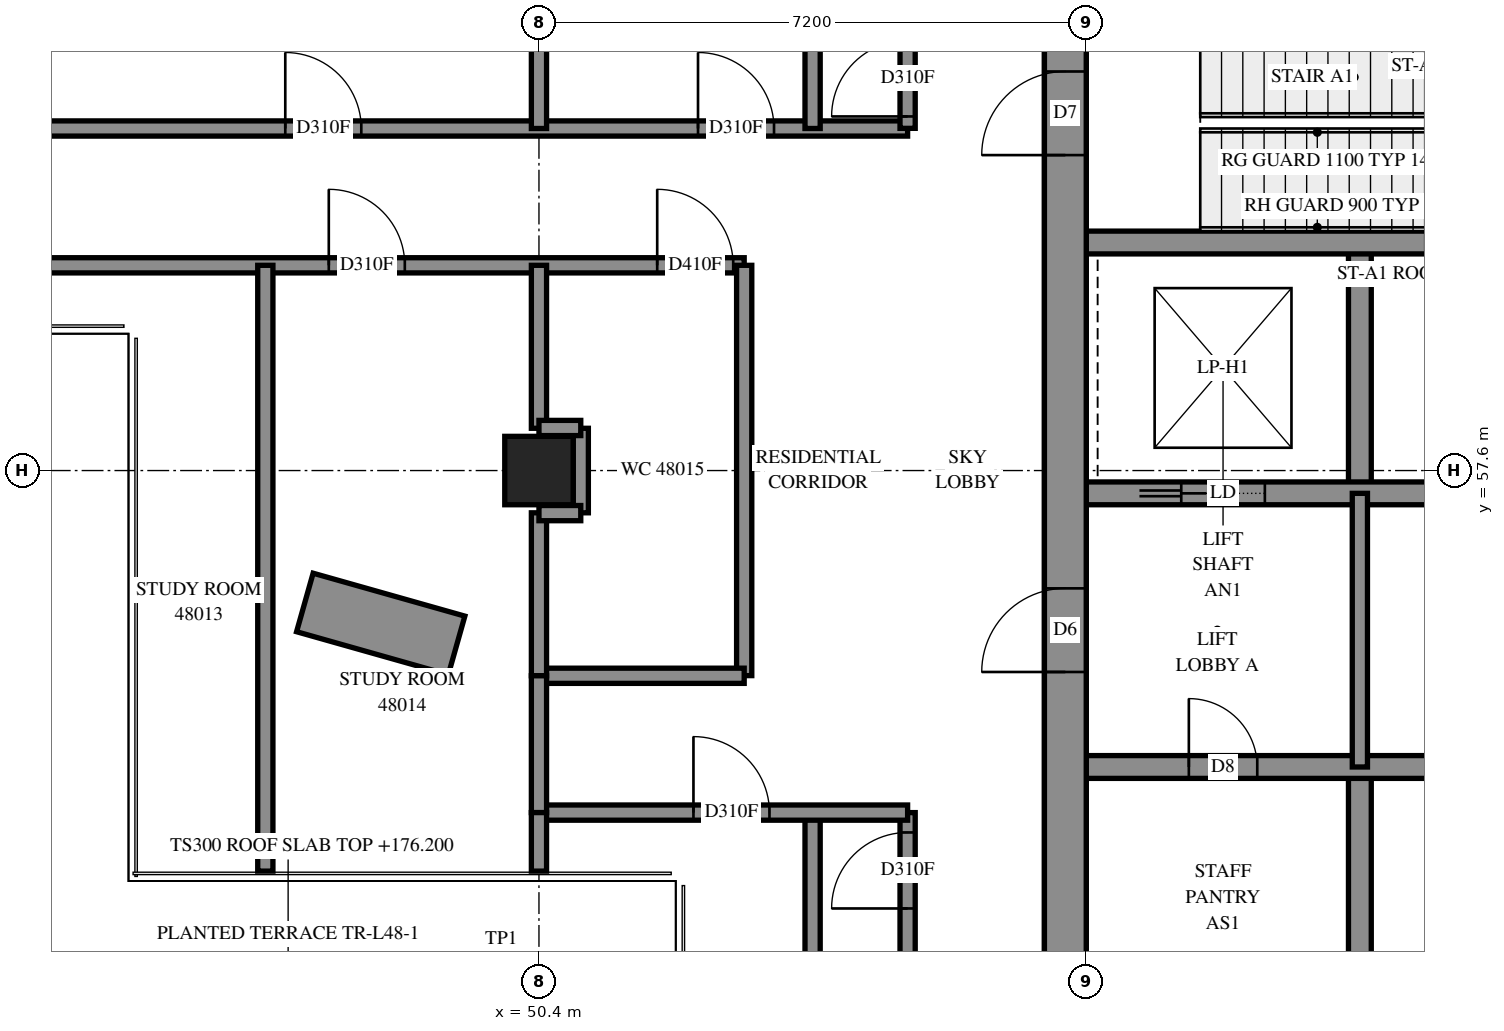
"""IFC4 building model, lengths in metres.
Left out: names, types, materials, properties, quantities, classifications, styles, units other than length and angle.
Written with IfcOpenShell. Run it as: python <this file> out.ifc"""

import sys

from ifc_helpers import new_model, si_unit, direction, frame, frame_2d, origin, origin_2d, place, context, subcontext, project, spatial, polyline, rectangle, outline, extrude, element, fill, save


model = new_model("IFC4")
c1 = context("Model", 3, precision=1e-05, world=origin(), true_north=direction((0.0, 1.0)))
c2 = subcontext(c1, "Body", "Model", "MODEL_VIEW")
j1 = project(units=[si_unit("LENGTHUNIT", "METRE"), si_unit("PLANEANGLEUNIT", "RADIAN")], contexts=[c1])
p1 = place(None, origin())
s1 = spatial("IfcSite", under=j1, at=p1, CompositionType="ELEMENT")
p2 = place(p1, origin())
s2 = spatial("IfcBuilding", under=s1, at=p2, CompositionType="ELEMENT")
p3 = place(p2, frame((0.0, 0.0, 176.2)))
s3 = spatial("IfcBuildingStorey", under=s2, at=p3, CompositionType="ELEMENT", Elevation=176.2)
p4 = place(p3, frame((50.4, 57.6, 0.0), z_axis=(0.0, 0.0, 1.0), x_axis=(1.0, 0.0, 0.0)))
e1 = element("IfcColumn", 1, at=p4, inside=s3, PredefinedType="COLUMN", context=c2, shape_type="SweptSolid", body=[
    extrude(rectangle(XDim=0.9, YDim=0.9, at=origin_2d()), origin(), (0.0, 0.0, 1.0), 3.9),
])
p5 = place(p3, frame((57.325, 50.4, -0.3), z_axis=(0.0, 0.0, 1.0), x_axis=(0.0, 1.0, 0.0)))
e2 = element("IfcWall", 2, at=p5, inside=s3, PredefinedType="SHEAR", context=c2, shape_type="SweptSolid", body=[
    extrude(rectangle(XDim=14.4, YDim=0.55, at=frame_2d((7.2, 0.0))), origin(), (0.0, 0.0, 1.0), 3.5),
])
p6 = place(p5, frame((4.55, 0.0, 0.3)))
e3 = element("IfcOpeningElement", 3, at=p6, cuts=e2, PredefinedType="OPENING", context=c2, shape_type="SweptSolid", body=[
    extrude(rectangle(XDim=1.1, YDim=2.1, at=frame_2d((0.55, 1.05))), frame((0.0, 0.285, 0.0), z_axis=(0.0, -1.0, 0.0), x_axis=(1.0, 0.0, 0.0)), (0.0, 0.0, 1.0), 0.57),
])
p7 = place(p5, frame((11.35, 0.0, 0.3)))
e4 = element("IfcOpeningElement", 4, at=p7, cuts=e2, PredefinedType="OPENING", context=c2, shape_type="SweptSolid", body=[
    extrude(rectangle(XDim=1.1, YDim=2.1, at=frame_2d((0.55, 1.05))), frame((0.0, 0.285, 0.0), z_axis=(0.0, -1.0, 0.0), x_axis=(1.0, 0.0, 0.0)), (0.0, 0.0, 1.0), 0.57),
])
for number, where, z_axis, x_axis in (
    (5, (61.2, 50.4, 0.0), (0.0, 0.0, 1.0), (0.0, 1.0, 0.0)),
    (6, (61.2, 57.3, 0.0), (0.0, 0.0, 1.0), (0.0, 1.0, 0.0)),
):
    element("IfcWall", number, at=place(p3, frame(where, z_axis=z_axis, x_axis=x_axis)), inside=s3, PredefinedType="SOLIDWALL", context=c2, shape_type="SweptSolid", body=[
        extrude(rectangle(XDim=3.3, YDim=0.3, at=frame_2d((1.65, 0.0))), origin(), (0.0, 0.0, 1.0), 3.9),
    ])
p8 = place(p3, frame((57.6, 53.7, 0.0), z_axis=(0.0, 0.0, 1.0), x_axis=(1.0, 0.0, 0.0)))
e7 = element("IfcWall", 7, at=p8, inside=s3, PredefinedType="SOLIDWALL", context=c2, shape_type="SweptSolid", body=[
    extrude(rectangle(XDim=14.4, YDim=0.3, at=frame_2d((7.2, 0.0))), origin(), (0.0, 0.0, 1.0), 3.9),
])
p9 = place(p8, frame((1.35, 0.0, 0.0)))
e8 = element("IfcOpeningElement", 8, at=p9, cuts=e7, PredefinedType="OPENING", context=c2, shape_type="SweptSolid", body=[
    extrude(rectangle(XDim=0.9, YDim=2.1, at=frame_2d((0.45, 1.05))), frame((0.0, 0.16, 0.0), z_axis=(0.0, -1.0, 0.0), x_axis=(1.0, 0.0, 0.0)), (0.0, 0.0, 1.0), 0.32),
])
p10 = place(p8, frame((4.95, 0.0, 0.0)))
e9 = element("IfcOpeningElement", 9, at=p10, cuts=e7, PredefinedType="OPENING", context=c2, shape_type="SweptSolid", body=[
    extrude(rectangle(XDim=0.9, YDim=2.1, at=frame_2d((0.45, 1.05))), frame((0.0, 0.16, 0.0), z_axis=(0.0, -1.0, 0.0), x_axis=(1.0, 0.0, 0.0)), (0.0, 0.0, 1.0), 0.32),
])
p11 = place(p8, frame((8.55, 0.0, 0.0)))
e10 = element("IfcOpeningElement", 10, at=p11, cuts=e7, PredefinedType="OPENING", context=c2, shape_type="SweptSolid", body=[
    extrude(rectangle(XDim=0.9, YDim=2.1, at=frame_2d((0.45, 1.05))), frame((0.0, 0.16, 0.0), z_axis=(0.0, -1.0, 0.0), x_axis=(1.0, 0.0, 0.0)), (0.0, 0.0, 1.0), 0.32),
])
p12 = place(p8, frame((12.05, 0.0, 0.0)))
e11 = element("IfcOpeningElement", 11, at=p12, cuts=e7, PredefinedType="OPENING", context=c2, shape_type="SweptSolid", body=[
    extrude(rectangle(XDim=1.1, YDim=2.1, at=frame_2d((0.55, 1.05))), frame((0.0, 0.16, 0.0), z_axis=(0.0, -1.0, 0.0), x_axis=(1.0, 0.0, 0.0)), (0.0, 0.0, 1.0), 0.32),
])
p13 = place(p3, frame((57.6, 57.3, 0.0), z_axis=(0.0, 0.0, 1.0), x_axis=(1.0, 0.0, 0.0)))
e12 = element("IfcWall", 12, at=p13, inside=s3, PredefinedType="SOLIDWALL", context=c2, shape_type="SweptSolid", body=[
    extrude(rectangle(XDim=14.4, YDim=0.3, at=frame_2d((7.2, 0.0))), origin(), (0.0, 0.0, 1.0), 3.9),
])
p14 = place(p13, frame((1.25, 0.0, 0.0)))
e13 = element("IfcOpeningElement", 13, at=p14, cuts=e12, PredefinedType="OPENING", context=c2, shape_type="SweptSolid", body=[
    extrude(rectangle(XDim=1.1, YDim=2.1, at=frame_2d((0.55, 1.05))), frame((0.0, 0.16, 0.0), z_axis=(0.0, -1.0, 0.0), x_axis=(1.0, 0.0, 0.0)), (0.0, 0.0, 1.0), 0.32),
])
p15 = place(p13, frame((4.85, 0.0, 0.0)))
e14 = element("IfcOpeningElement", 14, at=p15, cuts=e12, PredefinedType="OPENING", context=c2, shape_type="SweptSolid", body=[
    extrude(rectangle(XDim=1.1, YDim=2.1, at=frame_2d((0.55, 1.05))), frame((0.0, 0.16, 0.0), z_axis=(0.0, -1.0, 0.0), x_axis=(1.0, 0.0, 0.0)), (0.0, 0.0, 1.0), 0.32),
])
p16 = place(p13, frame((8.45, 0.0, 0.0)))
e15 = element("IfcOpeningElement", 15, at=p16, cuts=e12, PredefinedType="OPENING", context=c2, shape_type="SweptSolid", body=[
    extrude(rectangle(XDim=1.1, YDim=2.1, at=frame_2d((0.55, 1.05))), frame((0.0, 0.16, 0.0), z_axis=(0.0, -1.0, 0.0), x_axis=(1.0, 0.0, 0.0)), (0.0, 0.0, 1.0), 0.32),
])
p17 = place(p13, frame((12.05, 0.0, 0.0)))
e16 = element("IfcOpeningElement", 16, at=p17, cuts=e12, PredefinedType="OPENING", context=c2, shape_type="SweptSolid", body=[
    extrude(rectangle(XDim=1.1, YDim=2.1, at=frame_2d((0.55, 1.05))), frame((0.0, 0.16, 0.0), z_axis=(0.0, -1.0, 0.0), x_axis=(1.0, 0.0, 0.0)), (0.0, 0.0, 1.0), 0.32),
])
p18 = place(p3, frame((57.6, 60.6, 0.0), z_axis=(0.0, 0.0, 1.0), x_axis=(1.0, 0.0, 0.0)))
e17 = element("IfcWall", 17, at=p18, inside=s3, PredefinedType="SOLIDWALL", context=c2, shape_type="SweptSolid", body=[
    extrude(rectangle(XDim=7.2, YDim=0.3, at=frame_2d((3.6, 0.0))), origin(), (0.0, 0.0, 1.0), 3.9),
])
p19 = place(p3, frame((61.2, 53.7, 0.0), z_axis=(0.0, 0.0, 1.0), x_axis=(0.0, 1.0, 0.0)))
e18 = element("IfcWall", 18, at=p19, inside=s3, PredefinedType="PARTITIONING", context=c2, shape_type="SweptSolid", body=[
    extrude(rectangle(XDim=3.6, YDim=0.2, at=frame_2d((1.8, 0.0))), origin(), (0.0, 0.0, 1.0), 3.9),
])
p20 = place(p3, frame((37.93, 60.3, 0.0), z_axis=(0.0, 0.0, 1.0), x_axis=(1.0, 0.0, 0.0)))
e19 = element("IfcWall", 19, at=p20, inside=s3, PredefinedType="PARTITIONING", context=c2, shape_type="SweptSolid", body=[
    extrude(rectangle(XDim=15.17, YDim=0.2, at=frame_2d((7.585, 0.0))), origin(), (0.0, 0.0, 1.0), 3.9),
])
p21 = place(p20, frame((3.139, 0.0, 0.0)))
e20 = element("IfcOpeningElement", 20, at=p21, cuts=e19, PredefinedType="OPENING", context=c2, shape_type="SweptSolid", body=[
    extrude(rectangle(XDim=1.0, YDim=2.1, at=frame_2d((0.5, 1.05))), frame((0.0, 0.11, 0.0), z_axis=(0.0, -1.0, 0.0), x_axis=(1.0, 0.0, 0.0)), (0.0, 0.0, 1.0), 0.22),
])
p22 = place(p20, frame((9.705, 0.0, 0.0)))
e21 = element("IfcOpeningElement", 21, at=p22, cuts=e19, PredefinedType="OPENING", context=c2, shape_type="SweptSolid", body=[
    extrude(rectangle(XDim=1.0, YDim=2.1, at=frame_2d((0.5, 1.05))), frame((0.0, 0.11, 0.0), z_axis=(0.0, -1.0, 0.0), x_axis=(1.0, 0.0, 0.0)), (0.0, 0.0, 1.0), 0.22),
])
p23 = place(p20, frame((14.026, 0.0, 0.0)))
e22 = element("IfcOpeningElement", 22, at=p23, cuts=e19, PredefinedType="OPENING", context=c2, shape_type="SweptSolid", body=[
    extrude(rectangle(XDim=1.0, YDim=2.1, at=frame_2d((0.5, 1.05))), frame((0.0, 0.11, 0.0), z_axis=(0.0, -1.0, 0.0), x_axis=(1.0, 0.0, 0.0)), (0.0, 0.0, 1.0), 0.22),
])
p24 = place(p3, frame((40.502, 62.1, 0.0), z_axis=(0.0, 0.0, 1.0), x_axis=(1.0, 0.0, 0.0)))
e23 = element("IfcWall", 23, at=p24, inside=s3, PredefinedType="PARTITIONING", context=c2, shape_type="SweptSolid", body=[
    extrude(rectangle(XDim=14.748, YDim=0.2, at=frame_2d((7.374, 0.0))), origin(), (0.0, 0.0, 1.0), 3.9),
])
p25 = place(p24, frame((0.265, 0.0, 0.0)))
e24 = element("IfcOpeningElement", 24, at=p25, cuts=e23, PredefinedType="OPENING", context=c2, shape_type="SweptSolid", body=[
    extrude(rectangle(XDim=1.0, YDim=2.1, at=frame_2d((0.5, 1.05))), frame((0.0, 0.11, 0.0), z_axis=(0.0, -1.0, 0.0), x_axis=(1.0, 0.0, 0.0)), (0.0, 0.0, 1.0), 0.22),
])
p26 = place(p24, frame((6.561, 0.0, 0.0)))
e25 = element("IfcOpeningElement", 25, at=p26, cuts=e23, PredefinedType="OPENING", context=c2, shape_type="SweptSolid", body=[
    extrude(rectangle(XDim=1.0, YDim=2.1, at=frame_2d((0.5, 1.05))), frame((0.0, 0.11, 0.0), z_axis=(0.0, -1.0, 0.0), x_axis=(1.0, 0.0, 0.0)), (0.0, 0.0, 1.0), 0.22),
])
p27 = place(p24, frame((11.991, 0.0, 0.0)))
e26 = element("IfcOpeningElement", 26, at=p27, cuts=e23, PredefinedType="OPENING", context=c2, shape_type="SweptSolid", body=[
    extrude(rectangle(XDim=1.0, YDim=2.1, at=frame_2d((0.5, 1.05))), frame((0.0, 0.11, 0.0), z_axis=(0.0, -1.0, 0.0), x_axis=(1.0, 0.0, 0.0)), (0.0, 0.0, 1.0), 0.22),
])
for number, where, z_axis, x_axis in (
    (27, (46.8, 52.33, 0.0), (0.0, 0.0, 1.0), (0.0, 1.0, 0.0)),
    (28, (54.0, 45.13, 0.0), (0.0, 0.0, 1.0), (0.0, 1.0, 0.0)),
    (29, (54.0, 62.1, 0.0), (0.0, 0.0, 1.0), (0.0, 1.0, 0.0)),
):
    element("IfcWall", number, at=place(p3, frame(where, z_axis=z_axis, x_axis=x_axis)), inside=s3, PredefinedType="PARTITIONING", context=c2, shape_type="SweptSolid", body=[
        extrude(rectangle(XDim=7.97, YDim=0.2, at=frame_2d((3.985, 0.0))), origin(), (0.0, 0.0, 1.0), 3.9),
    ])
p28 = place(p3, frame((53.1, 54.902, 0.0), z_axis=(0.0, 0.0, 1.0), x_axis=(0.0, 1.0, 0.0)))
e30 = element("IfcWall", 30, at=p28, inside=s3, PredefinedType="PARTITIONING", context=c2, shape_type="SweptSolid", body=[
    extrude(rectangle(XDim=5.398, YDim=0.2, at=frame_2d((2.699, 0.0))), origin(), (0.0, 0.0, 1.0), 3.9),
])
p29 = place(p3, frame((55.25, 48.05, 0.0), z_axis=(0.0, 0.0, 1.0), x_axis=(0.0, 1.0, 0.0)))
e31 = element("IfcWall", 31, at=p29, inside=s3, PredefinedType="PARTITIONING", context=c2, shape_type="SweptSolid", body=[
    extrude(rectangle(XDim=5.05, YDim=0.2, at=frame_2d((2.525, 0.0))), origin(), (0.0, 0.0, 1.0), 3.9),
])
p30 = place(p29, frame((3.789, 0.0, 0.0)))
e32 = element("IfcOpeningElement", 32, at=p30, cuts=e31, PredefinedType="OPENING", context=c2, shape_type="SweptSolid", body=[
    extrude(rectangle(XDim=1.0, YDim=2.1, at=frame_2d((0.5, 1.05))), frame((0.0, 0.11, 0.0), z_axis=(0.0, -1.0, 0.0), x_axis=(1.0, 0.0, 0.0)), (0.0, 0.0, 1.0), 0.22),
])
p31 = place(p3, frame((55.25, 62.102, 0.0), z_axis=(0.0, 0.0, 1.0), x_axis=(0.0, 1.0, 0.0)))
e33 = element("IfcWall", 33, at=p31, inside=s3, PredefinedType="PARTITIONING", context=c2, shape_type="SweptSolid", body=[
    extrude(rectangle(XDim=5.048, YDim=0.2, at=frame_2d((2.524, 0.0))), origin(), (0.0, 0.0, 1.0), 3.9),
])
p32 = place(p31, frame((0.157, 0.0, 0.0)))
e34 = element("IfcOpeningElement", 34, at=p32, cuts=e33, PredefinedType="OPENING", context=c2, shape_type="SweptSolid", body=[
    extrude(rectangle(XDim=1.0, YDim=2.1, at=frame_2d((0.5, 1.05))), frame((0.0, 0.11, 0.0), z_axis=(0.0, -1.0, 0.0), x_axis=(1.0, 0.0, 0.0)), (0.0, 0.0, 1.0), 0.22),
])
p33 = place(p3, frame((50.4, 53.1, 0.0), z_axis=(0.0, 0.0, 1.0), x_axis=(1.0, 0.0, 0.0)))
e35 = element("IfcWall", 35, at=p33, inside=s3, PredefinedType="PARTITIONING", context=c2, shape_type="SweptSolid", body=[
    extrude(rectangle(XDim=4.85, YDim=0.2, at=frame_2d((2.425, 0.0))), origin(), (0.0, 0.0, 1.0), 3.9),
])
p34 = place(p33, frame((2.033, 0.0, 0.0)))
e36 = element("IfcOpeningElement", 36, at=p34, cuts=e35, PredefinedType="OPENING", context=c2, shape_type="SweptSolid", body=[
    extrude(rectangle(XDim=1.0, YDim=2.1, at=frame_2d((0.5, 1.05))), frame((0.0, 0.11, 0.0), z_axis=(0.0, -1.0, 0.0), x_axis=(1.0, 0.0, 0.0)), (0.0, 0.0, 1.0), 0.22),
])
p35 = place(p3, frame((50.4, 54.9, 0.0), z_axis=(0.0, 0.0, 1.0), x_axis=(1.0, 0.0, 0.0)))
e37 = element("IfcWall", 37, at=p35, inside=s3, PredefinedType="PARTITIONING", context=c2, shape_type="SweptSolid", body=[
    extrude(rectangle(XDim=2.7, YDim=0.2, at=frame_2d((1.35, 0.0))), origin(), (0.0, 0.0, 1.0), 3.9),
])
p36 = place(p3, frame((50.4, 62.1, 0.0), z_axis=(0.0, 0.0, 1.0), x_axis=(0.0, 1.0, 0.0)))
e38 = element("IfcWall", 38, at=p36, inside=s3, PredefinedType="PARTITIONING", context=c2, shape_type="SweptSolid", body=[
    extrude(rectangle(XDim=2.25, YDim=0.2, at=frame_2d((1.125, 0.0))), origin(), (0.0, 0.0, 1.0), 3.9),
])
for number, where, z_axis, x_axis in (
    (39, (50.4, 54.9, 0.0), (0.0, 0.0, 1.0), (0.0, 1.0, 0.0)),
    (40, (50.4, 58.156, 0.0), (0.0, 0.0, 1.0), (0.0, 1.0, 0.0)),
):
    element("IfcWall", number, at=place(p3, frame(where, z_axis=z_axis, x_axis=x_axis)), inside=s3, PredefinedType="PARTITIONING", context=c2, shape_type="SweptSolid", body=[
        extrude(rectangle(XDim=2.144, YDim=0.2, at=frame_2d((1.072, 0.0))), origin(), (0.0, 0.0, 1.0), 3.9),
    ])
p37 = place(p3, frame((50.4, 53.1, 0.0), z_axis=(0.0, 0.0, 1.0), x_axis=(0.0, 1.0, 0.0)))
e41 = element("IfcWall", 41, at=p37, inside=s3, PredefinedType="PARTITIONING", context=c2, shape_type="SweptSolid", body=[
    extrude(rectangle(XDim=1.8, YDim=0.2, at=frame_2d((0.9, 0.0))), origin(), (0.0, 0.0, 1.0), 3.9),
])
p38 = place(p3, frame((50.95, 57.044, 0.0), z_axis=(0.0, 0.0, 1.0), x_axis=(0.0, 1.0, 0.0)))
e42 = element("IfcWall", 42, at=p38, inside=s3, PredefinedType="PARTITIONING", context=c2, shape_type="SweptSolid", body=[
    extrude(rectangle(XDim=1.112, YDim=0.2, at=frame_2d((0.556, 0.0))), origin(), (0.0, 0.0, 1.0), 3.9),
])
p39 = place(p3, frame((50.4, 52.33, 0.0), z_axis=(0.0, 0.0, 1.0), x_axis=(0.0, 1.0, 0.0)))
e43 = element("IfcWall", 43, at=p39, inside=s3, PredefinedType="PARTITIONING", context=c2, shape_type="SweptSolid", body=[
    extrude(rectangle(XDim=0.77, YDim=0.2, at=frame_2d((0.385, 0.0))), origin(), (0.0, 0.0, 1.0), 3.9),
])
for number, where, z_axis, x_axis in (
    (44, (50.4, 58.16, 0.0), (0.0, 0.0, 1.0), (1.0, 0.0, 0.0)),
    (45, (50.4, 57.04, 0.0), (0.0, 0.0, 1.0), (1.0, 0.0, 0.0)),
):
    element("IfcWall", number, at=place(p3, frame(where, z_axis=z_axis, x_axis=x_axis)), inside=s3, PredefinedType="PARTITIONING", context=c2, shape_type="SweptSolid", body=[
        extrude(rectangle(XDim=0.55, YDim=0.2, at=frame_2d((0.275, 0.0))), origin(), (0.0, 0.0, 1.0), 3.9),
    ])
p40 = place(p3, frame((49.316, 55.3, 0.0), z_axis=(0.0, 0.0, 1.0), x_axis=(-0.962267982, 0.2721035295, 0.0)))
e46 = element("IfcWall", 46, at=p40, inside=s3, PredefinedType="SOLIDWALL", context=c2, shape_type="SweptSolid", body=[
    extrude(outline(polyline([(0.0, -0.4), (2.075, -0.4), (2.075, 0.4), (0.0, 0.4), (0.0, -0.4)])), origin(), (0.0, 0.0, 1.0), 0.65),
])
p41 = place(p6, origin())
e47 = element("IfcDoor", 47, at=p41, inside=s3, OperationType="DOUBLE_DOOR_SINGLE_SWING", PredefinedType="DOOR", context=c2, shape_type="SweptSolid", body=[
    extrude(rectangle(XDim=1.1, YDim=2.1, at=frame_2d((0.55, 1.05))), frame((0.0, 0.025, 0.0), z_axis=(0.0, -1.0, 0.0), x_axis=(1.0, 0.0, 0.0)), (0.0, 0.0, 1.0), 0.05),
])
fill(e3, e47)
p42 = place(p7, origin())
e48 = element("IfcDoor", 48, at=p42, inside=s3, OperationType="SINGLE_SWING_LEFT", PredefinedType="DOOR", context=c2, shape_type="SweptSolid", body=[
    extrude(rectangle(XDim=1.1, YDim=2.1, at=frame_2d((0.55, 1.05))), frame((0.0, 0.025, 0.0), z_axis=(0.0, -1.0, 0.0), x_axis=(1.0, 0.0, 0.0)), (0.0, 0.0, 1.0), 0.05),
])
fill(e4, e48)
p43 = place(p9, origin())
e49 = element("IfcDoor", 49, at=p43, inside=s3, OperationType="SINGLE_SWING_LEFT", PredefinedType="DOOR", context=c2, shape_type="SweptSolid", body=[
    extrude(rectangle(XDim=0.9, YDim=2.1, at=frame_2d((0.45, 1.05))), frame((0.0, 0.025, 0.0), z_axis=(0.0, -1.0, 0.0), x_axis=(1.0, 0.0, 0.0)), (0.0, 0.0, 1.0), 0.05),
])
fill(e8, e49)
p44 = place(p14, origin())
e50 = element("IfcDoor", 50, at=p44, inside=s3, OperationType="SLIDING_TO_LEFT", PredefinedType="DOOR", context=c2, shape_type="SweptSolid", body=[
    extrude(rectangle(XDim=1.1, YDim=2.1, at=frame_2d((0.55, 1.05))), frame((0.0, 0.025, 0.0), z_axis=(0.0, -1.0, 0.0), x_axis=(1.0, 0.0, 0.0)), (0.0, 0.0, 1.0), 0.05),
])
fill(e13, e50)
p45 = place(p22, origin())
e51 = element("IfcDoor", 51, at=p45, inside=s3, OperationType="SINGLE_SWING_RIGHT", PredefinedType="DOOR", context=c2, shape_type="SweptSolid", body=[
    extrude(rectangle(XDim=1.0, YDim=2.1, at=frame_2d((0.5, 1.05))), frame((0.0, 0.025, 0.0), z_axis=(0.0, -1.0, 0.0), x_axis=(1.0, 0.0, 0.0)), (0.0, 0.0, 1.0), 0.05),
])
fill(e21, e51)
p46 = place(p23, origin())
e52 = element("IfcDoor", 52, at=p46, inside=s3, OperationType="SINGLE_SWING_LEFT", PredefinedType="DOOR", context=c2, shape_type="SweptSolid", body=[
    extrude(rectangle(XDim=1.0, YDim=2.1, at=frame_2d((0.5, 1.05))), frame((0.0, 0.025, 0.0), z_axis=(0.0, -1.0, 0.0), x_axis=(1.0, 0.0, 0.0)), (0.0, 0.0, 1.0), 0.05),
])
fill(e22, e52)
p47 = place(p34, origin())
e53 = element("IfcDoor", 53, at=p47, inside=s3, OperationType="SINGLE_SWING_LEFT", PredefinedType="DOOR", context=c2, shape_type="SweptSolid", body=[
    extrude(rectangle(XDim=1.0, YDim=2.1, at=frame_2d((0.5, 1.05))), frame((0.0, 0.025, 0.0), z_axis=(0.0, -1.0, 0.0), x_axis=(1.0, 0.0, 0.0)), (0.0, 0.0, 1.0), 0.05),
])
fill(e36, e53)
p48 = place(p30, origin())
e54 = element("IfcDoor", 54, at=p48, inside=s3, OperationType="SINGLE_SWING_RIGHT", PredefinedType="DOOR", context=c2, shape_type="SweptSolid", body=[
    extrude(rectangle(XDim=1.0, YDim=2.1, at=frame_2d((0.5, 1.05))), frame((0.0, 0.025, 0.0), z_axis=(0.0, -1.0, 0.0), x_axis=(1.0, 0.0, 0.0)), (0.0, 0.0, 1.0), 0.05),
])
fill(e32, e54)
p49 = place(p26, origin())
e55 = element("IfcDoor", 55, at=p49, inside=s3, OperationType="SINGLE_SWING_RIGHT", PredefinedType="DOOR", context=c2, shape_type="SweptSolid", body=[
    extrude(rectangle(XDim=1.0, YDim=2.1, at=frame_2d((0.5, 1.05))), frame((0.0, 0.025, 0.0), z_axis=(0.0, -1.0, 0.0), x_axis=(1.0, 0.0, 0.0)), (0.0, 0.0, 1.0), 0.05),
])
fill(e25, e55)
p50 = place(p27, origin())
e56 = element("IfcDoor", 56, at=p50, inside=s3, OperationType="SINGLE_SWING_RIGHT", PredefinedType="DOOR", context=c2, shape_type="SweptSolid", body=[
    extrude(rectangle(XDim=1.0, YDim=2.1, at=frame_2d((0.5, 1.05))), frame((0.0, 0.025, 0.0), z_axis=(0.0, -1.0, 0.0), x_axis=(1.0, 0.0, 0.0)), (0.0, 0.0, 1.0), 0.05),
])
fill(e26, e56)
p51 = place(p32, origin())
e57 = element("IfcDoor", 57, at=p51, inside=s3, OperationType="SINGLE_SWING_LEFT", PredefinedType="DOOR", context=c2, shape_type="SweptSolid", body=[
    extrude(rectangle(XDim=1.0, YDim=2.1, at=frame_2d((0.5, 1.05))), frame((0.0, 0.025, 0.0), z_axis=(0.0, -1.0, 0.0), x_axis=(1.0, 0.0, 0.0)), (0.0, 0.0, 1.0), 0.05),
])
fill(e34, e57)
save(model, sys.argv[1])
